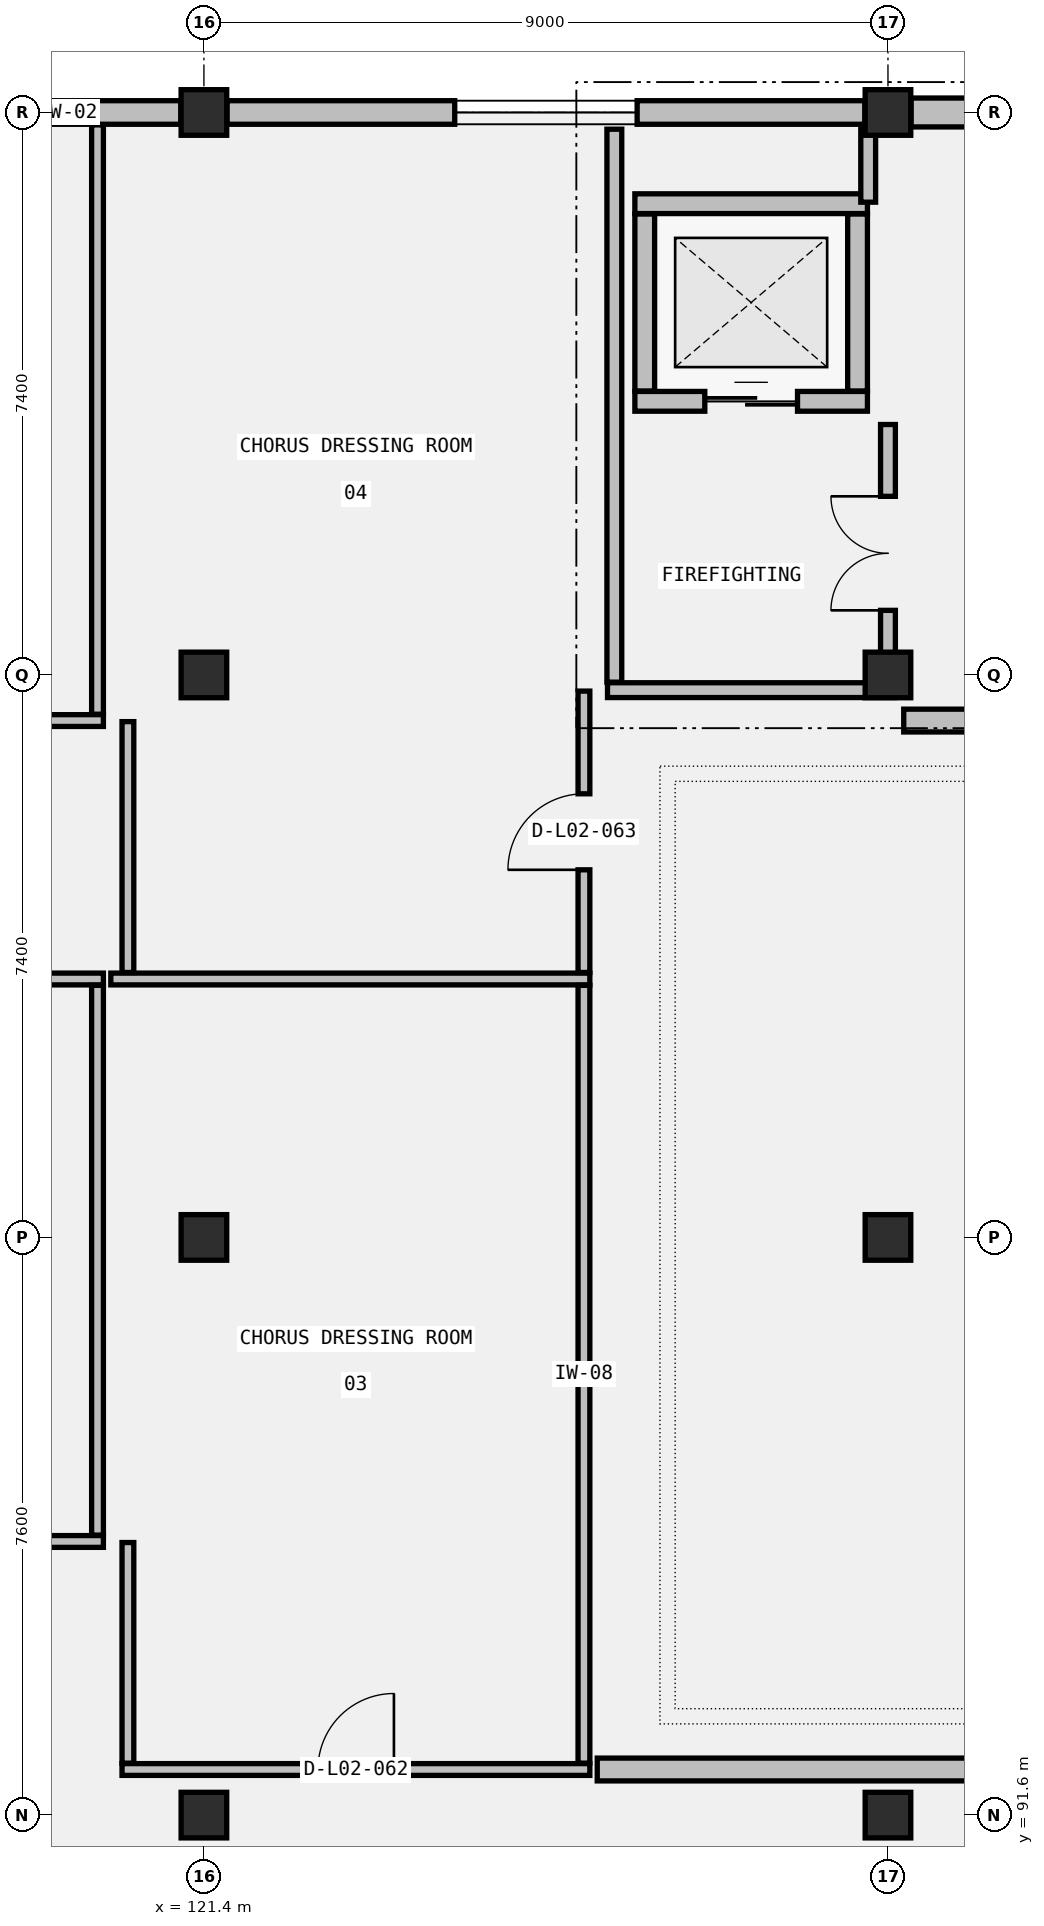
"""IFC4 building model, lengths in metres.
Left out: names, types, materials, properties, quantities, classifications, styles, units other than length and angle.
Written with IfcOpenShell. Run it as: python <this file> out.ifc"""

import sys

from ifc_helpers import new_model, si_unit, direction, frame, frame_2d, origin, origin_2d, place, context, subcontext, project, spatial, rectangle, extrude, element, fill, save


model = new_model("IFC4")
c1 = context("Model", 3, precision=1e-05, world=origin(), true_north=direction((0.0, 1.0)))
c2 = subcontext(c1, "Body", "Model", "MODEL_VIEW")
j1 = project(units=[si_unit("LENGTHUNIT", "METRE"), si_unit("PLANEANGLEUNIT", "RADIAN")], contexts=[c1])
p1 = place(None, origin())
s1 = spatial("IfcSite", under=j1, at=p1, CompositionType="ELEMENT")
p2 = place(p1, origin())
s2 = spatial("IfcBuilding", under=s1, at=p2, CompositionType="ELEMENT")
p3 = place(p2, frame((0.0, 0.0, 10.0)))
s3 = spatial("IfcBuildingStorey", under=s2, at=p3, CompositionType="ELEMENT", Elevation=10.0)
for number, where, z_axis, x_axis in (
    (1, (121.4, 91.6, 0.0), (0.0, 0.0, 1.0), (1.0, 0.0, 0.0)),
    (2, (121.4, 99.2, 0.0), (0.0, 0.0, 1.0), (1.0, 0.0, 0.0)),
    (3, (121.4, 106.6, 0.0), (0.0, 0.0, 1.0), (1.0, 0.0, 0.0)),
    (4, (121.4, 114.0, 0.0), (0.0, 0.0, 1.0), (1.0, 0.0, 0.0)),
    (5, (130.4, 91.6, 0.0), (0.0, 0.0, 1.0), (1.0, 0.0, 0.0)),
    (6, (130.4, 99.2, 0.0), (0.0, 0.0, 1.0), (1.0, 0.0, 0.0)),
    (7, (130.4, 106.6, 0.0), (0.0, 0.0, 1.0), (1.0, 0.0, 0.0)),
    (8, (130.4, 114.0, 0.0), (0.0, 0.0, 1.0), (1.0, 0.0, 0.0)),
):
    element("IfcColumn", number, at=place(p3, frame(where, z_axis=z_axis, x_axis=x_axis)), inside=s3, PredefinedType="COLUMN", context=c2, shape_type="SweptSolid", body=[
        extrude(rectangle(XDim=0.6, YDim=0.6, at=origin_2d()), origin(), (0.0, 0.0, 1.0), 4.6),
    ])
p4 = place(p3, frame((112.779, 114.0, 0.0), z_axis=(0.0, 0.0, 1.0), x_axis=(1.0, 0.0, 0.0)))
e9 = element("IfcWall", 9, at=p4, inside=s3, PredefinedType="STANDARD", context=c2, shape_type="SweptSolid", body=[
    extrude(rectangle(XDim=8.317, YDim=0.31, at=frame_2d((4.158, 0.0))), origin(), (0.0, 0.0, 1.0), 3.738),
])
p5 = place(p4, frame((2.958, 0.0, 0.9)))
e10 = element("IfcOpeningElement", 10, at=p5, cuts=e9, PredefinedType="OPENING", context=c2, shape_type="SweptSolid", body=[
    extrude(rectangle(XDim=2.4, YDim=2.4, at=frame_2d((1.2, 1.2))), frame((0.0, 0.165, 0.0), z_axis=(0.0, -1.0, 0.0), x_axis=(1.0, 0.0, 0.0)), (0.0, 0.0, 1.0), 0.33),
])
p6 = place(p3, frame((121.704, 114.0, 0.0), z_axis=(0.0, 0.0, 1.0), x_axis=(1.0, 0.0, 0.0)))
e11 = element("IfcWall", 11, at=p6, inside=s3, PredefinedType="STANDARD", context=c2, shape_type="SweptSolid", body=[
    extrude(rectangle(XDim=8.392, YDim=0.31, at=frame_2d((4.196, 0.0))), origin(), (0.0, 0.0, 1.0), 3.738),
])
p7 = place(p6, frame((2.996, 0.0, 0.9)))
e12 = element("IfcOpeningElement", 12, at=p7, cuts=e11, PredefinedType="OPENING", context=c2, shape_type="SweptSolid", body=[
    extrude(rectangle(XDim=2.4, YDim=2.4, at=frame_2d((1.2, 1.2))), frame((0.0, 0.165, 0.0), z_axis=(0.0, -1.0, 0.0), x_axis=(1.0, 0.0, 0.0)), (0.0, 0.0, 1.0), 0.33),
])
p8 = place(p3, frame((130.704, 114.0, 0.0), z_axis=(0.0, 0.0, 1.0), x_axis=(1.0, 0.0, 0.0)))
e13 = element("IfcWall", 13, at=p8, inside=s3, PredefinedType="STANDARD", context=c2, shape_type="SweptSolid", body=[
    extrude(rectangle(XDim=8.392, YDim=0.38, at=frame_2d((4.196, 0.0))), origin(), (0.0, 0.0, 1.0), 3.898),
])
p9 = place(p3, frame((127.07, 110.2, 0.0), z_axis=(0.0, 0.0, 1.0), x_axis=(1.0, 0.0, 0.0)))
e14 = element("IfcWall", 14, at=p9, inside=s3, PredefinedType="STANDARD", context=c2, shape_type="SweptSolid", body=[
    extrude(rectangle(XDim=3.06, YDim=0.26, at=frame_2d((1.53, 0.0))), origin(), (0.0, 0.0, 1.0), 4.36),
])
p10 = place(p9, frame((0.92, 0.0, 0.0)))
e15 = element("IfcOpeningElement", 15, at=p10, cuts=e14, PredefinedType="OPENING", context=c2, shape_type="SweptSolid", body=[
    extrude(rectangle(XDim=1.22, YDim=2.2, at=frame_2d((0.61, 1.1))), frame((0.0, 0.14, 0.0), z_axis=(0.0, -1.0, 0.0), x_axis=(1.0, 0.0, 0.0)), (0.0, 0.0, 1.0), 0.28),
])
p11 = place(p3, frame((127.07, 112.8, 0.0), z_axis=(0.0, 0.0, 1.0), x_axis=(1.0, 0.0, 0.0)))
e16 = element("IfcWall", 16, at=p11, inside=s3, PredefinedType="STANDARD", context=c2, shape_type="SweptSolid", body=[
    extrude(rectangle(XDim=3.06, YDim=0.26, at=frame_2d((1.53, 0.0))), origin(), (0.0, 0.0, 1.0), 4.36),
])
for number, where, z_axis, x_axis in (
    (17, (127.2, 110.336, 0.0), (0.0, 0.0, 1.0), (0.0, 1.0, 0.0)),
    (18, (130.0, 110.336, 0.0), (0.0, 0.0, 1.0), (0.0, 1.0, 0.0)),
):
    element("IfcWall", number, at=place(p3, frame(where, z_axis=z_axis, x_axis=x_axis)), inside=s3, PredefinedType="STANDARD", context=c2, shape_type="SweptSolid", body=[
        extrude(rectangle(XDim=2.328, YDim=0.26, at=frame_2d((1.164, 0.0))), origin(), (0.0, 0.0, 1.0), 4.36),
    ])
p12 = place(p3, frame((126.8, 106.505, 0.0), z_axis=(0.0, 0.0, 1.0), x_axis=(0.0, 1.0, 0.0)))
e19 = element("IfcWall", 19, at=p12, inside=s3, PredefinedType="PARTITIONING", context=c2, shape_type="SweptSolid", body=[
    extrude(rectangle(XDim=7.275, YDim=0.195, at=frame_2d((3.638, 0.0))), origin(), (0.0, 0.0, 1.0), 3.898),
])
p13 = place(p3, frame((126.71, 106.4, 0.0), z_axis=(0.0, 0.0, 1.0), x_axis=(1.0, 0.0, 0.0)))
e20 = element("IfcWall", 20, at=p13, inside=s3, PredefinedType="PARTITIONING", context=c2, shape_type="SweptSolid", body=[
    extrude(rectangle(XDim=3.78, YDim=0.195, at=frame_2d((1.89, 0.0))), origin(), (0.0, 0.0, 1.0), 3.738),
])
p14 = place(p3, frame((130.4, 106.505, 0.0), z_axis=(0.0, 0.0, 1.0), x_axis=(0.0, 1.0, 0.0)))
e21 = element("IfcWall", 21, at=p14, inside=s3, PredefinedType="PARTITIONING", context=c2, shape_type="SweptSolid", body=[
    extrude(rectangle(XDim=3.39, YDim=0.195, at=frame_2d((1.695, 0.0))), origin(), (0.0, 0.0, 1.0), 4.044),
])
p15 = place(p14, frame((0.945, 0.0, 0.0)))
e22 = element("IfcOpeningElement", 22, at=p15, cuts=e21, PredefinedType="OPENING", context=c2, shape_type="SweptSolid", body=[
    extrude(rectangle(XDim=1.5, YDim=2.2, at=frame_2d((0.75, 1.1))), frame((0.0, 0.107, 0.0), z_axis=(0.0, -1.0, 0.0), x_axis=(1.0, 0.0, 0.0)), (0.0, 0.0, 1.0), 0.215),
])
p16 = place(p3, frame((130.14, 112.82, 0.0), z_axis=(0.0, 0.0, 1.0), x_axis=(0.0, 1.0, 0.0)))
e23 = element("IfcWall", 23, at=p16, inside=s3, PredefinedType="PARTITIONING", context=c2, shape_type="SweptSolid", body=[
    extrude(rectangle(XDim=0.96, YDim=0.195, at=frame_2d((0.48, 0.0))), origin(), (0.0, 0.0, 1.0), 3.898),
])
for number, where, z_axis, x_axis in (
    (24, (116.135, 95.2, 0.0), (0.0, 0.0, 1.0), (1.0, 0.0, 0.0)),
    (25, (116.135, 102.6, 0.0), (0.0, 0.0, 1.0), (1.0, 0.0, 0.0)),
):
    element("IfcWall", number, at=place(p3, frame(where, z_axis=z_axis, x_axis=x_axis)), inside=s3, PredefinedType="PARTITIONING", context=c2, shape_type="SweptSolid", body=[
        extrude(rectangle(XDim=3.942, YDim=0.155, at=frame_2d((1.971, 0.0))), origin(), (0.0, 0.0, 1.0), 3.738),
    ])
p17 = place(p3, frame((120.0, 95.283, 0.0), z_axis=(0.0, 0.0, 1.0), x_axis=(0.0, 1.0, 0.0)))
e26 = element("IfcWall", 26, at=p17, inside=s3, PredefinedType="PARTITIONING", context=c2, shape_type="SweptSolid", body=[
    extrude(rectangle(XDim=7.233, YDim=0.155, at=frame_2d((3.617, 0.0))), origin(), (0.0, 0.0, 1.0), 3.898),
])
p18 = place(p3, frame((116.135, 106.0, 0.0), z_axis=(0.0, 0.0, 1.0), x_axis=(1.0, 0.0, 0.0)))
e27 = element("IfcWall", 27, at=p18, inside=s3, PredefinedType="PARTITIONING", context=c2, shape_type="SweptSolid", body=[
    extrude(rectangle(XDim=3.942, YDim=0.155, at=frame_2d((1.971, 0.0))), origin(), (0.0, 0.0, 1.0), 3.738),
])
p19 = place(p3, frame((120.0, 106.083, 0.0), z_axis=(0.0, 0.0, 1.0), x_axis=(0.0, 1.0, 0.0)))
e28 = element("IfcWall", 28, at=p19, inside=s3, PredefinedType="PARTITIONING", context=c2, shape_type="SweptSolid", body=[
    extrude(rectangle(XDim=7.753, YDim=0.155, at=frame_2d((3.877, 0.0))), origin(), (0.0, 0.0, 1.0), 3.898),
])
p20 = place(p3, frame((120.323, 92.2, 0.0), z_axis=(0.0, 0.0, 1.0), x_axis=(1.0, 0.0, 0.0)))
e29 = element("IfcWall", 29, at=p20, inside=s3, PredefinedType="PARTITIONING", context=c2, shape_type="SweptSolid", body=[
    extrude(rectangle(XDim=6.155, YDim=0.155, at=frame_2d((3.078, 0.0))), origin(), (0.0, 0.0, 1.0), 3.738),
])
p21 = place(p20, frame((2.577, 0.0, 0.0)))
e30 = element("IfcOpeningElement", 30, at=p21, cuts=e29, PredefinedType="OPENING", context=c2, shape_type="SweptSolid", body=[
    extrude(rectangle(XDim=1.0, YDim=2.15, at=frame_2d((0.5, 1.075))), frame((0.0, 0.087, 0.0), z_axis=(0.0, -1.0, 0.0), x_axis=(1.0, 0.0, 0.0)), (0.0, 0.0, 1.0), 0.175),
])
p22 = place(p3, frame((120.175, 102.6, 0.0), z_axis=(0.0, 0.0, 1.0), x_axis=(1.0, 0.0, 0.0)))
e31 = element("IfcWall", 31, at=p22, inside=s3, PredefinedType="PARTITIONING", context=c2, shape_type="SweptSolid", body=[
    extrude(rectangle(XDim=6.302, YDim=0.155, at=frame_2d((3.151, 0.0))), origin(), (0.0, 0.0, 1.0), 3.738),
])
p23 = place(p3, frame((120.4, 92.283, 0.0), z_axis=(0.0, 0.0, 1.0), x_axis=(0.0, 1.0, 0.0)))
e32 = element("IfcWall", 32, at=p23, inside=s3, PredefinedType="PARTITIONING", context=c2, shape_type="SweptSolid", body=[
    extrude(rectangle(XDim=2.903, YDim=0.155, at=frame_2d((1.451, 0.0))), origin(), (0.0, 0.0, 1.0), 4.36),
])
p24 = place(p3, frame((126.4, 92.283, 0.0), z_axis=(0.0, 0.0, 1.0), x_axis=(0.0, 1.0, 0.0)))
e33 = element("IfcWall", 33, at=p24, inside=s3, PredefinedType="PARTITIONING", context=c2, shape_type="SweptSolid", body=[
    extrude(rectangle(XDim=10.233, YDim=0.155, at=frame_2d((5.117, 0.0))), origin(), (0.0, 0.0, 1.0), 3.898),
])
p25 = place(p3, frame((126.4, 102.686, 0.0), z_axis=(0.0, 0.0, 1.0), x_axis=(0.0, 1.0, 0.0)))
e34 = element("IfcWall", 34, at=p25, inside=s3, PredefinedType="PARTITIONING", context=c2, shape_type="SweptSolid", body=[
    extrude(rectangle(XDim=3.702, YDim=0.155, at=frame_2d((1.851, 0.0))), origin(), (0.0, 0.0, 1.0), 3.898),
])
p26 = place(p25, frame((1.351, 0.0, 0.0)))
e35 = element("IfcOpeningElement", 35, at=p26, cuts=e34, PredefinedType="OPENING", context=c2, shape_type="SweptSolid", body=[
    extrude(rectangle(XDim=1.0, YDim=2.15, at=frame_2d((0.5, 1.075))), frame((0.0, 0.087, 0.0), z_axis=(0.0, -1.0, 0.0), x_axis=(1.0, 0.0, 0.0)), (0.0, 0.0, 1.0), 0.175),
])
p27 = place(p3, frame((120.4, 102.686, 0.0), z_axis=(0.0, 0.0, 1.0), x_axis=(0.0, 1.0, 0.0)))
e36 = element("IfcWall", 36, at=p27, inside=s3, PredefinedType="PARTITIONING", context=c2, shape_type="SweptSolid", body=[
    extrude(rectangle(XDim=3.301, YDim=0.155, at=frame_2d((1.65, 0.0))), origin(), (0.0, 0.0, 1.0), 4.36),
])
p28 = place(p3, frame((126.575, 92.2, 0.0), z_axis=(0.0, 0.0, 1.0), x_axis=(1.0, 0.0, 0.0)))
e37 = element("IfcWall", 37, at=p28, inside=s3, PredefinedType="PARTITIONING", context=c2, shape_type="SweptSolid", body=[
    extrude(rectangle(XDim=14.575, YDim=0.3, at=frame_2d((7.288, 0.0))), origin(), (0.0, 0.0, 1.0), 3.738),
])
p29 = place(p28, frame((6.427, 0.0, 0.0)))
e38 = element("IfcOpeningElement", 38, at=p29, cuts=e37, PredefinedType="OPENING", context=c2, shape_type="SweptSolid", body=[
    extrude(rectangle(XDim=1.72, YDim=2.38, at=frame_2d((0.86, 1.19))), frame((0.0, 0.16, 0.0), z_axis=(0.0, -1.0, 0.0), x_axis=(1.0, 0.0, 0.0)), (0.0, 0.0, 1.0), 0.32),
])
p30 = place(p3, frame((130.607, 106.0, 0.0), z_axis=(0.0, 0.0, 1.0), x_axis=(1.0, 0.0, 0.0)))
e39 = element("IfcWall", 39, at=p30, inside=s3, PredefinedType="PARTITIONING", context=c2, shape_type="SweptSolid", body=[
    extrude(rectangle(XDim=10.542, YDim=0.3, at=frame_2d((5.271, 0.0))), origin(), (0.0, 0.0, 1.0), 3.738),
])
p31 = place(p7, origin())
e40 = element("IfcWindow", 40, at=p31, inside=s3, PartitioningType="TRIPLE_PANEL_VERTICAL", PredefinedType="WINDOW", context=c2, shape_type="SweptSolid", body=[
    extrude(rectangle(XDim=2.4, YDim=2.4, at=frame_2d((1.2, 1.2))), frame((0.0, 0.03, 0.0), z_axis=(0.0, -1.0, 0.0), x_axis=(1.0, 0.0, 0.0)), (0.0, 0.0, 1.0), 0.06),
])
fill(e12, e40)
p32 = place(p10, origin())
e41 = element("IfcDoor", 41, at=p32, inside=s3, OperationType="SLIDING_TO_RIGHT", PredefinedType="DOOR", context=c2, shape_type="SweptSolid", body=[
    extrude(rectangle(XDim=1.22, YDim=2.2, at=frame_2d((0.61, 1.1))), frame((0.0, 0.025, 0.0), z_axis=(0.0, -1.0, 0.0), x_axis=(1.0, 0.0, 0.0)), (0.0, 0.0, 1.0), 0.05),
])
fill(e15, e41)
p33 = place(p15, origin())
e42 = element("IfcDoor", 42, at=p33, inside=s3, OperationType="DOUBLE_DOOR_SINGLE_SWING", PredefinedType="DOOR", context=c2, shape_type="SweptSolid", body=[
    extrude(rectangle(XDim=1.5, YDim=2.2, at=frame_2d((0.75, 1.1))), frame((0.0, 0.025, 0.0), z_axis=(0.0, -1.0, 0.0), x_axis=(1.0, 0.0, 0.0)), (0.0, 0.0, 1.0), 0.05),
])
fill(e22, e42)
p34 = place(p21, origin())
e43 = element("IfcDoor", 43, at=p34, inside=s3, OperationType="SINGLE_SWING_RIGHT", PredefinedType="DOOR", context=c2, shape_type="SweptSolid", body=[
    extrude(rectangle(XDim=1.0, YDim=2.15, at=frame_2d((0.5, 1.075))), frame((0.0, 0.025, 0.0), z_axis=(0.0, -1.0, 0.0), x_axis=(1.0, 0.0, 0.0)), (0.0, 0.0, 1.0), 0.05),
])
fill(e30, e43)
p35 = place(p26, origin())
e44 = element("IfcDoor", 44, at=p35, inside=s3, OperationType="SINGLE_SWING_LEFT", PredefinedType="DOOR", context=c2, shape_type="SweptSolid", body=[
    extrude(rectangle(XDim=1.0, YDim=2.15, at=frame_2d((0.5, 1.075))), frame((0.0, 0.025, 0.0), z_axis=(0.0, -1.0, 0.0), x_axis=(1.0, 0.0, 0.0)), (0.0, 0.0, 1.0), 0.05),
])
fill(e35, e44)
save(model, sys.argv[1])
